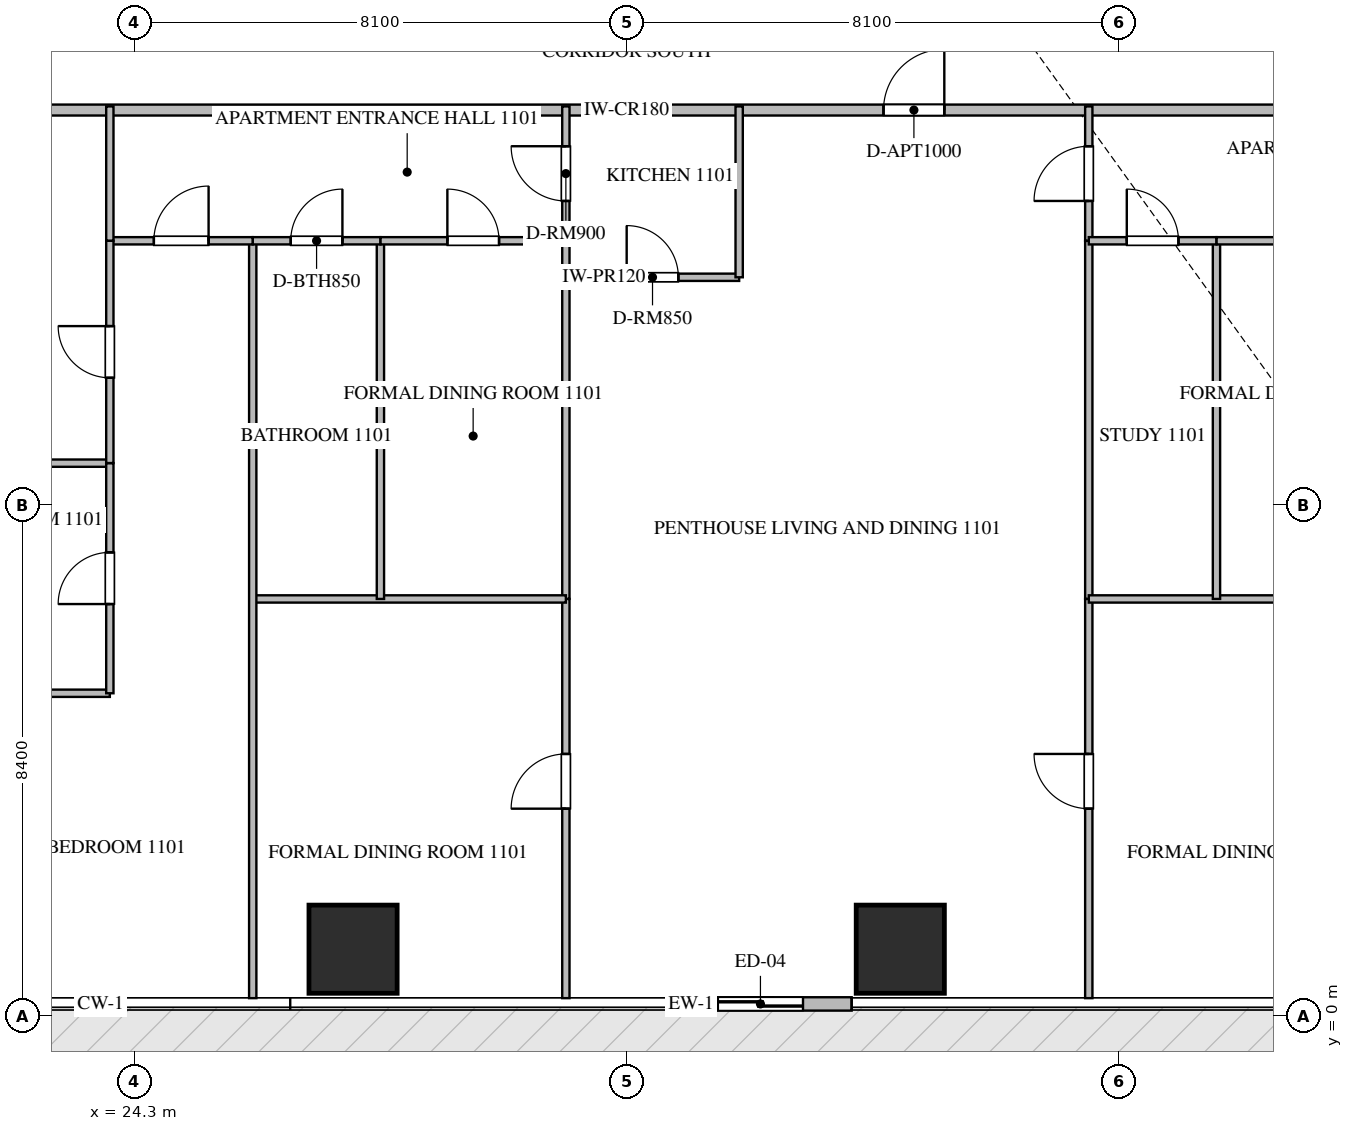
"""IFC4 building model, lengths in metres.
Left out: names, types, materials, properties, quantities, classifications, styles, units other than length and angle.
Written with IfcOpenShell. Run it as: python <this file> out.ifc"""

import sys

from ifc_helpers import new_model, si_unit, direction, frame, frame_2d, origin, origin_2d, place, context, subcontext, project, spatial, rectangle, extrude, source, transform, mapped, element, fill, save


model = new_model("IFC4")
c1 = context("Model", 3, precision=1e-05, world=origin(), true_north=direction((0.0, 1.0)))
c2 = subcontext(c1, "Body", "Model", "MODEL_VIEW")
j1 = project(units=[si_unit("LENGTHUNIT", "METRE"), si_unit("PLANEANGLEUNIT", "RADIAN")], contexts=[c1])
p1 = place(None, origin())
s1 = spatial("IfcSite", under=j1, at=p1, CompositionType="ELEMENT")
p2 = place(p1, origin())
s2 = spatial("IfcBuilding", under=s1, at=p2, CompositionType="ELEMENT")
p3 = place(p2, frame((0.0, 0.0, 49.2)))
s3 = spatial("IfcBuildingStorey", under=s2, at=p3, CompositionType="ELEMENT", Elevation=49.2)
m1 = source(origin(), c2, "Body", "SweptSolid", [
    extrude(rectangle(XDim=1.45, YDim=1.45, at=origin_2d()), origin(), (0.0, 0.0, 1.0), 3.75),
])
for number, where, z_axis, x_axis in (
    (1, (27.9, 1.1, -0.26), (0.0, 0.0, 1.0), (1.0, 0.0, 0.0)),
    (2, (36.9, 1.1, -0.26), (0.0, 0.0, 1.0), (1.0, 0.0, 0.0)),
):
    element("IfcColumn", number, at=place(p3, frame(where, z_axis=z_axis, x_axis=x_axis)), inside=s3, PredefinedType="COLUMN", context=c2, shape_type="MappedRepresentation", body=[
        mapped(m1, transform((0.0, 0.0, 0.0), scale=1.0)),
    ])
p4 = place(p3, frame((33.1, 0.2, 0.0), z_axis=(0.0, 0.0, 1.0), x_axis=(1.0, 0.0, 0.0)))
e3 = element("IfcWall", 3, at=p4, inside=s3, PredefinedType="ELEMENTEDWALL", context=c2, shape_type="SweptSolid", body=[
    extrude(rectangle(XDim=3.0, YDim=0.22, at=frame_2d((1.5, 0.0))), origin(), (0.0, 0.0, 1.0), 3.475),
])
p5 = place(p4, frame((0.8, 0.0, 0.0)))
e4 = element("IfcOpeningElement", 4, at=p5, cuts=e3, PredefinedType="OPENING", context=c2, shape_type="SweptSolid", body=[
    extrude(rectangle(XDim=1.4, YDim=2.25, at=frame_2d((0.7, 1.125))), frame((0.0, 0.12, 0.0), z_axis=(0.0, -1.0, 0.0), x_axis=(1.0, 0.0, 0.0)), (0.0, 0.0, 1.0), 0.24),
])
p6 = place(p3, frame((21.402, 14.9, 0.0), z_axis=(0.0, 0.0, 1.0), x_axis=(1.0, 0.0, 0.0)))
e5 = element("IfcWall", 5, at=p6, inside=s3, PredefinedType="PARTITIONING", context=c2, shape_type="SweptSolid", body=[
    extrude(rectangle(XDim=21.996, YDim=0.18, at=frame_2d((10.998, 0.0))), origin(), (0.0, 0.0, 1.0), 3.49),
])
p7 = place(p6, frame((15.222, 0.0, 0.0)))
e6 = element("IfcOpeningElement", 6, at=p7, cuts=e5, PredefinedType="OPENING", context=c2, shape_type="SweptSolid", body=[
    extrude(rectangle(XDim=1.0, YDim=2.15, at=frame_2d((0.5, 1.075))), frame((0.0, 0.1, 0.0), z_axis=(0.0, -1.0, 0.0), x_axis=(1.0, 0.0, 0.0)), (0.0, 0.0, 1.0), 0.2),
])
p8 = place(p3, frame((31.4, 12.15, 0.0), z_axis=(0.0, 0.0, 1.0), x_axis=(1.0, 0.0, 0.0)))
e7 = element("IfcWall", 7, at=p8, inside=s3, PredefinedType="PARTITIONING", context=c2, shape_type="SweptSolid", body=[
    extrude(rectangle(XDim=2.85, YDim=0.12, at=frame_2d((1.425, 0.0))), origin(), (0.0, 0.0, 1.0), 3.49),
])
p9 = place(p8, frame((1.0, 0.0, 0.0)))
e8 = element("IfcOpeningElement", 8, at=p9, cuts=e7, PredefinedType="OPENING", context=c2, shape_type="SweptSolid", body=[
    extrude(rectangle(XDim=0.85, YDim=2.1, at=frame_2d((0.425, 1.05))), frame((0.0, 0.07, 0.0), z_axis=(0.0, -1.0, 0.0), x_axis=(1.0, 0.0, 0.0)), (0.0, 0.0, 1.0), 0.14),
])
p10 = place(p3, frame((34.25, 12.15, 0.0), z_axis=(0.0, 0.0, 1.0), x_axis=(0.0, 1.0, 0.0)))
e9 = element("IfcWall", 9, at=p10, inside=s3, PredefinedType="PARTITIONING", context=c2, shape_type="SweptSolid", body=[
    extrude(rectangle(XDim=2.81, YDim=0.12, at=frame_2d((1.405, 0.0))), origin(), (0.0, 0.0, 1.0), 3.49),
])
p11 = place(p3, frame((31.4, 12.75, 0.0), z_axis=(0.0, 0.0, 1.0), x_axis=(0.0, 1.0, 0.0)))
e10 = element("IfcWall", 10, at=p11, inside=s3, PredefinedType="PARTITIONING", context=c2, shape_type="SweptSolid", body=[
    extrude(rectangle(XDim=2.21, YDim=0.12, at=frame_2d((1.105, 0.0))), origin(), (0.0, 0.0, 1.0), 3.49),
])
p12 = place(p11, frame((0.655, 0.0, 0.0)))
e11 = element("IfcOpeningElement", 11, at=p12, cuts=e10, PredefinedType="OPENING", context=c2, shape_type="SweptSolid", body=[
    extrude(rectangle(XDim=0.9, YDim=2.1, at=frame_2d((0.45, 1.05))), frame((0.0, 0.07, 0.0), z_axis=(0.0, -1.0, 0.0), x_axis=(1.0, 0.0, 0.0)), (0.0, 0.0, 1.0), 0.14),
])
p13 = place(p3, frame((31.4, 0.295, 0.0), z_axis=(0.0, 0.0, 1.0), x_axis=(0.0, 1.0, 0.0)))
e12 = element("IfcWall", 12, at=p13, inside=s3, PredefinedType="PARTITIONING", context=c2, shape_type="SweptSolid", body=[
    extrude(rectangle(XDim=6.565, YDim=0.12, at=frame_2d((3.283, 0.0))), origin(), (0.0, 0.0, 1.0), 3.49),
])
p14 = place(p13, frame((3.116, 0.0, 0.0)))
e13 = element("IfcOpeningElement", 13, at=p14, cuts=e12, PredefinedType="OPENING", context=c2, shape_type="SweptSolid", body=[
    extrude(rectangle(XDim=0.9, YDim=2.1, at=frame_2d((0.45, 1.05))), frame((0.0, 0.07, 0.0), z_axis=(0.0, -1.0, 0.0), x_axis=(1.0, 0.0, 0.0)), (0.0, 0.0, 1.0), 0.14),
])
p15 = place(p3, frame((31.4, 6.862, 0.0), z_axis=(0.0, 0.0, 1.0), x_axis=(0.0, 1.0, 0.0)))
e14 = element("IfcWall", 14, at=p15, inside=s3, PredefinedType="PARTITIONING", context=c2, shape_type="SweptSolid", body=[
    extrude(rectangle(XDim=5.886, YDim=0.12, at=frame_2d((2.943, 0.0))), origin(), (0.0, 0.0, 1.0), 3.49),
])
p16 = place(p3, frame((26.25, 6.86, 0.0), z_axis=(0.0, 0.0, 1.0), x_axis=(1.0, 0.0, 0.0)))
e15 = element("IfcWall", 15, at=p16, inside=s3, PredefinedType="PARTITIONING", context=c2, shape_type="SweptSolid", body=[
    extrude(rectangle(XDim=5.15, YDim=0.12, at=frame_2d((2.575, 0.0))), origin(), (0.0, 0.0, 1.0), 3.49),
])
p17 = place(p3, frame((26.25, 0.295, 0.0), z_axis=(0.0, 0.0, 1.0), x_axis=(0.0, 1.0, 0.0)))
e16 = element("IfcWall", 16, at=p17, inside=s3, PredefinedType="PARTITIONING", context=c2, shape_type="SweptSolid", body=[
    extrude(rectangle(XDim=12.455, YDim=0.12, at=frame_2d((6.228, 0.0))), origin(), (0.0, 0.0, 1.0), 3.49),
])
p18 = place(p3, frame((28.35, 6.86, 0.0), z_axis=(0.0, 0.0, 1.0), x_axis=(0.0, 1.0, 0.0)))
e17 = element("IfcWall", 17, at=p18, inside=s3, PredefinedType="PARTITIONING", context=c2, shape_type="SweptSolid", body=[
    extrude(rectangle(XDim=5.89, YDim=0.12, at=frame_2d((2.945, 0.0))), origin(), (0.0, 0.0, 1.0), 3.49),
])
p19 = place(p3, frame((26.25, 12.75, 0.0), z_axis=(0.0, 0.0, 1.0), x_axis=(1.0, 0.0, 0.0)))
e18 = element("IfcWall", 18, at=p19, inside=s3, PredefinedType="PARTITIONING", context=c2, shape_type="SweptSolid", body=[
    extrude(rectangle(XDim=2.1, YDim=0.12, at=frame_2d((1.05, 0.0))), origin(), (0.0, 0.0, 1.0), 3.49),
])
p20 = place(p19, frame((0.625, 0.0, 0.0)))
e19 = element("IfcOpeningElement", 19, at=p20, cuts=e18, PredefinedType="OPENING", context=c2, shape_type="SweptSolid", body=[
    extrude(rectangle(XDim=0.85, YDim=2.1, at=frame_2d((0.425, 1.05))), frame((0.0, 0.07, 0.0), z_axis=(0.0, -1.0, 0.0), x_axis=(1.0, 0.0, 0.0)), (0.0, 0.0, 1.0), 0.14),
])
p21 = place(p3, frame((28.352, 12.75, 0.0), z_axis=(0.0, 0.0, 1.0), x_axis=(1.0, 0.0, 0.0)))
e20 = element("IfcWall", 20, at=p21, inside=s3, PredefinedType="PARTITIONING", context=c2, shape_type="SweptSolid", body=[
    extrude(rectangle(XDim=3.048, YDim=0.12, at=frame_2d((1.524, 0.0))), origin(), (0.0, 0.0, 1.0), 3.49),
])
p22 = place(p21, frame((1.099, 0.0, 0.0)))
e21 = element("IfcOpeningElement", 21, at=p22, cuts=e20, PredefinedType="OPENING", context=c2, shape_type="SweptSolid", body=[
    extrude(rectangle(XDim=0.85, YDim=2.1, at=frame_2d((0.425, 1.05))), frame((0.0, 0.07, 0.0), z_axis=(0.0, -1.0, 0.0), x_axis=(1.0, 0.0, 0.0)), (0.0, 0.0, 1.0), 0.14),
])
p23 = place(p3, frame((23.9, 12.75, 0.0), z_axis=(0.0, 0.0, 1.0), x_axis=(1.0, 0.0, 0.0)))
e22 = element("IfcWall", 22, at=p23, inside=s3, PredefinedType="PARTITIONING", context=c2, shape_type="SweptSolid", body=[
    extrude(rectangle(XDim=2.348, YDim=0.12, at=frame_2d((1.174, 0.0))), origin(), (0.0, 0.0, 1.0), 3.49),
])
p24 = place(p23, frame((0.724, 0.0, 0.0)))
e23 = element("IfcOpeningElement", 23, at=p24, cuts=e22, PredefinedType="OPENING", context=c2, shape_type="SweptSolid", body=[
    extrude(rectangle(XDim=0.9, YDim=2.1, at=frame_2d((0.45, 1.05))), frame((0.0, 0.07, 0.0), z_axis=(0.0, -1.0, 0.0), x_axis=(1.0, 0.0, 0.0)), (0.0, 0.0, 1.0), 0.14),
])
for number, where, z_axis, x_axis in (
    (24, (20.2, 5.309, 0.0), (0.0, 0.0, 1.0), (1.0, 0.0, 0.0)),
    (25, (20.2, 9.093, 0.0), (0.0, 0.0, 1.0), (1.0, 0.0, 0.0)),
):
    element("IfcWall", number, at=place(p3, frame(where, z_axis=z_axis, x_axis=x_axis)), inside=s3, PredefinedType="PARTITIONING", context=c2, shape_type="SweptSolid", body=[
        extrude(rectangle(XDim=3.7, YDim=0.12, at=frame_2d((1.85, 0.0))), origin(), (0.0, 0.0, 1.0), 3.49),
    ])
p25 = place(p3, frame((23.9, 5.309, 0.0), z_axis=(0.0, 0.0, 1.0), x_axis=(0.0, 1.0, 0.0)))
e26 = element("IfcWall", 26, at=p25, inside=s3, PredefinedType="PARTITIONING", context=c2, shape_type="SweptSolid", body=[
    extrude(rectangle(XDim=3.784, YDim=0.12, at=frame_2d((1.892, 0.0))), origin(), (0.0, 0.0, 1.0), 3.49),
])
p26 = place(p25, frame((1.467, 0.0, 0.0)))
e27 = element("IfcOpeningElement", 27, at=p26, cuts=e26, PredefinedType="OPENING", context=c2, shape_type="SweptSolid", body=[
    extrude(rectangle(XDim=0.85, YDim=2.1, at=frame_2d((0.425, 1.05))), frame((0.0, 0.07, 0.0), z_axis=(0.0, -1.0, 0.0), x_axis=(1.0, 0.0, 0.0)), (0.0, 0.0, 1.0), 0.14),
])
p27 = place(p3, frame((23.9, 9.095, 0.0), z_axis=(0.0, 0.0, 1.0), x_axis=(0.0, 1.0, 0.0)))
e28 = element("IfcWall", 28, at=p27, inside=s3, PredefinedType="PARTITIONING", context=c2, shape_type="SweptSolid", body=[
    extrude(rectangle(XDim=3.655, YDim=0.12, at=frame_2d((1.828, 0.0))), origin(), (0.0, 0.0, 1.0), 3.49),
])
p28 = place(p27, frame((1.402, 0.0, 0.0)))
e29 = element("IfcOpeningElement", 29, at=p28, cuts=e28, PredefinedType="OPENING", context=c2, shape_type="SweptSolid", body=[
    extrude(rectangle(XDim=0.85, YDim=2.1, at=frame_2d((0.425, 1.05))), frame((0.0, 0.07, 0.0), z_axis=(0.0, -1.0, 0.0), x_axis=(1.0, 0.0, 0.0)), (0.0, 0.0, 1.0), 0.14),
])
p29 = place(p3, frame((23.9, 12.752, 0.0), z_axis=(0.0, 0.0, 1.0), x_axis=(0.0, 1.0, 0.0)))
e30 = element("IfcWall", 30, at=p29, inside=s3, PredefinedType="PARTITIONING", context=c2, shape_type="SweptSolid", body=[
    extrude(rectangle(XDim=2.208, YDim=0.12, at=frame_2d((1.104, 0.0))), origin(), (0.0, 0.0, 1.0), 3.49),
])
p30 = place(p3, frame((40.0, 12.75, 0.0), z_axis=(0.0, 0.0, 1.0), x_axis=(0.0, 1.0, 0.0)))
e31 = element("IfcWall", 31, at=p30, inside=s3, PredefinedType="PARTITIONING", context=c2, shape_type="SweptSolid", body=[
    extrude(rectangle(XDim=2.21, YDim=0.12, at=frame_2d((1.105, 0.0))), origin(), (0.0, 0.0, 1.0), 3.49),
])
p31 = place(p30, frame((0.655, 0.0, 0.0)))
e32 = element("IfcOpeningElement", 32, at=p31, cuts=e31, PredefinedType="OPENING", context=c2, shape_type="SweptSolid", body=[
    extrude(rectangle(XDim=0.9, YDim=2.1, at=frame_2d((0.45, 1.05))), frame((0.0, 0.07, 0.0), z_axis=(0.0, -1.0, 0.0), x_axis=(1.0, 0.0, 0.0)), (0.0, 0.0, 1.0), 0.14),
])
p32 = place(p3, frame((40.0, 0.295, 0.0), z_axis=(0.0, 0.0, 1.0), x_axis=(0.0, 1.0, 0.0)))
e33 = element("IfcWall", 33, at=p32, inside=s3, PredefinedType="PARTITIONING", context=c2, shape_type="SweptSolid", body=[
    extrude(rectangle(XDim=6.565, YDim=0.12, at=frame_2d((3.283, 0.0))), origin(), (0.0, 0.0, 1.0), 3.49),
])
p33 = place(p32, frame((3.116, 0.0, 0.0)))
e34 = element("IfcOpeningElement", 34, at=p33, cuts=e33, PredefinedType="OPENING", context=c2, shape_type="SweptSolid", body=[
    extrude(rectangle(XDim=0.9, YDim=2.1, at=frame_2d((0.45, 1.05))), frame((0.0, 0.07, 0.0), z_axis=(0.0, -1.0, 0.0), x_axis=(1.0, 0.0, 0.0)), (0.0, 0.0, 1.0), 0.14),
])
p34 = place(p3, frame((40.0, 6.862, 0.0), z_axis=(0.0, 0.0, 1.0), x_axis=(0.0, 1.0, 0.0)))
e35 = element("IfcWall", 35, at=p34, inside=s3, PredefinedType="PARTITIONING", context=c2, shape_type="SweptSolid", body=[
    extrude(rectangle(XDim=5.886, YDim=0.12, at=frame_2d((2.943, 0.0))), origin(), (0.0, 0.0, 1.0), 3.49),
])
p35 = place(p3, frame((40.0, 6.86, 0.0), z_axis=(0.0, 0.0, 1.0), x_axis=(1.0, 0.0, 0.0)))
e36 = element("IfcWall", 36, at=p35, inside=s3, PredefinedType="PARTITIONING", context=c2, shape_type="SweptSolid", body=[
    extrude(rectangle(XDim=5.15, YDim=0.12, at=frame_2d((2.575, 0.0))), origin(), (0.0, 0.0, 1.0), 3.49),
])
p36 = place(p3, frame((42.1, 6.86, 0.0), z_axis=(0.0, 0.0, 1.0), x_axis=(0.0, 1.0, 0.0)))
e37 = element("IfcWall", 37, at=p36, inside=s3, PredefinedType="PARTITIONING", context=c2, shape_type="SweptSolid", body=[
    extrude(rectangle(XDim=5.89, YDim=0.12, at=frame_2d((2.945, 0.0))), origin(), (0.0, 0.0, 1.0), 3.49),
])
p37 = place(p3, frame((40.0, 12.75, 0.0), z_axis=(0.0, 0.0, 1.0), x_axis=(1.0, 0.0, 0.0)))
e38 = element("IfcWall", 38, at=p37, inside=s3, PredefinedType="PARTITIONING", context=c2, shape_type="SweptSolid", body=[
    extrude(rectangle(XDim=2.1, YDim=0.12, at=frame_2d((1.05, 0.0))), origin(), (0.0, 0.0, 1.0), 3.49),
])
p38 = place(p37, frame((0.625, 0.0, 0.0)))
e39 = element("IfcOpeningElement", 39, at=p38, cuts=e38, PredefinedType="OPENING", context=c2, shape_type="SweptSolid", body=[
    extrude(rectangle(XDim=0.85, YDim=2.1, at=frame_2d((0.425, 1.05))), frame((0.0, 0.07, 0.0), z_axis=(0.0, -1.0, 0.0), x_axis=(1.0, 0.0, 0.0)), (0.0, 0.0, 1.0), 0.14),
])
p39 = place(p3, frame((42.102, 12.75, 0.0), z_axis=(0.0, 0.0, 1.0), x_axis=(1.0, 0.0, 0.0)))
e40 = element("IfcWall", 40, at=p39, inside=s3, PredefinedType="PARTITIONING", context=c2, shape_type="SweptSolid", body=[
    extrude(rectangle(XDim=3.048, YDim=0.12, at=frame_2d((1.524, 0.0))), origin(), (0.0, 0.0, 1.0), 3.49),
])
p40 = place(p39, frame((1.099, 0.0, 0.0)))
e41 = element("IfcOpeningElement", 41, at=p40, cuts=e40, PredefinedType="OPENING", context=c2, shape_type="SweptSolid", body=[
    extrude(rectangle(XDim=0.85, YDim=2.1, at=frame_2d((0.425, 1.05))), frame((0.0, 0.07, 0.0), z_axis=(0.0, -1.0, 0.0), x_axis=(1.0, 0.0, 0.0)), (0.0, 0.0, 1.0), 0.14),
])
m2 = source(origin(), c2, "Body", "SweptSolid", [
    extrude(rectangle(XDim=1.4, YDim=2.25, at=frame_2d((0.7, 1.125))), frame((0.0, 0.025, 0.0), z_axis=(0.0, -1.0, 0.0), x_axis=(1.0, 0.0, 0.0)), (0.0, 0.0, 1.0), 0.05),
])
p41 = place(p5, origin())
e42 = element("IfcDoor", 42, at=p41, inside=s3, OperationType="SLIDING_TO_LEFT", PredefinedType="DOOR", context=c2, shape_type="MappedRepresentation", body=[
    mapped(m2, transform((0.0, 0.0, 0.0), scale=1.0)),
])
fill(e4, e42)
m3 = source(origin(), c2, "Body", "SweptSolid", [
    extrude(rectangle(XDim=1.0, YDim=2.15, at=frame_2d((0.5, 1.075))), frame((0.0, 0.025, 0.0), z_axis=(0.0, -1.0, 0.0), x_axis=(1.0, 0.0, 0.0)), (0.0, 0.0, 1.0), 0.05),
])
p42 = place(p7, origin())
e43 = element("IfcDoor", 43, at=p42, inside=s3, OperationType="SINGLE_SWING_RIGHT", PredefinedType="DOOR", context=c2, shape_type="MappedRepresentation", body=[
    mapped(m3, transform((0.0, 0.0, 0.0), scale=1.0)),
])
fill(e6, e43)
m4 = source(origin(), c2, "Body", "SweptSolid", [
    extrude(rectangle(XDim=0.85, YDim=2.1, at=frame_2d((0.425, 1.05))), frame((0.0, 0.025, 0.0), z_axis=(0.0, -1.0, 0.0), x_axis=(1.0, 0.0, 0.0)), (0.0, 0.0, 1.0), 0.05),
])
p43 = place(p9, origin())
e44 = element("IfcDoor", 44, at=p43, inside=s3, OperationType="SINGLE_SWING_LEFT", PredefinedType="DOOR", context=c2, shape_type="MappedRepresentation", body=[
    mapped(m4, transform((0.0, 0.0, 0.0), scale=1.0)),
])
fill(e8, e44)
m5 = source(origin(), c2, "Body", "SweptSolid", [
    extrude(rectangle(XDim=0.9, YDim=2.1, at=frame_2d((0.45, 1.05))), frame((0.0, 0.025, 0.0), z_axis=(0.0, -1.0, 0.0), x_axis=(1.0, 0.0, 0.0)), (0.0, 0.0, 1.0), 0.05),
])
p44 = place(p12, origin())
e45 = element("IfcDoor", 45, at=p44, inside=s3, OperationType="SINGLE_SWING_RIGHT", PredefinedType="DOOR", context=c2, shape_type="MappedRepresentation", body=[
    mapped(m5, transform((0.0, 0.0, 0.0), scale=1.0)),
])
fill(e11, e45)
p45 = place(p14, origin())
e46 = element("IfcDoor", 46, at=p45, inside=s3, OperationType="SINGLE_SWING_LEFT", PredefinedType="DOOR", context=c2, shape_type="MappedRepresentation", body=[
    mapped(m5, transform((0.0, 0.0, 0.0), scale=1.0)),
])
fill(e13, e46)
p46 = place(p20, origin())
e47 = element("IfcDoor", 47, at=p46, inside=s3, OperationType="SINGLE_SWING_RIGHT", PredefinedType="DOOR", context=c2, shape_type="MappedRepresentation", body=[
    mapped(m4, transform((0.0, 0.0, 0.0), scale=1.0)),
])
fill(e19, e47)
p47 = place(p22, origin())
e48 = element("IfcDoor", 48, at=p47, inside=s3, OperationType="SINGLE_SWING_LEFT", PredefinedType="DOOR", context=c2, shape_type="MappedRepresentation", body=[
    mapped(m4, transform((0.0, 0.0, 0.0), scale=1.0)),
])
fill(e21, e48)
p48 = place(p24, origin())
e49 = element("IfcDoor", 49, at=p48, inside=s3, OperationType="SINGLE_SWING_RIGHT", PredefinedType="DOOR", context=c2, shape_type="MappedRepresentation", body=[
    mapped(m5, transform((0.0, 0.0, 0.0), scale=1.0)),
])
fill(e23, e49)
p49 = place(p26, origin())
e50 = element("IfcDoor", 50, at=p49, inside=s3, OperationType="SINGLE_SWING_LEFT", PredefinedType="DOOR", context=c2, shape_type="MappedRepresentation", body=[
    mapped(m4, transform((0.0, 0.0, 0.0), scale=1.0)),
])
fill(e27, e50)
p50 = place(p28, origin())
e51 = element("IfcDoor", 51, at=p50, inside=s3, OperationType="SINGLE_SWING_RIGHT", PredefinedType="DOOR", context=c2, shape_type="MappedRepresentation", body=[
    mapped(m4, transform((0.0, 0.0, 0.0), scale=1.0)),
])
fill(e29, e51)
p51 = place(p31, origin())
e52 = element("IfcDoor", 52, at=p51, inside=s3, OperationType="SINGLE_SWING_LEFT", PredefinedType="DOOR", context=c2, shape_type="MappedRepresentation", body=[
    mapped(m5, transform((0.0, 0.0, 0.0), scale=1.0)),
])
fill(e32, e52)
p52 = place(p33, origin())
e53 = element("IfcDoor", 53, at=p52, inside=s3, OperationType="SINGLE_SWING_RIGHT", PredefinedType="DOOR", context=c2, shape_type="MappedRepresentation", body=[
    mapped(m5, transform((0.0, 0.0, 0.0), scale=1.0)),
])
fill(e34, e53)
p53 = place(p38, origin())
e54 = element("IfcDoor", 54, at=p53, inside=s3, OperationType="SINGLE_SWING_LEFT", PredefinedType="DOOR", context=c2, shape_type="MappedRepresentation", body=[
    mapped(m4, transform((0.0, 0.0, 0.0), scale=1.0)),
])
fill(e39, e54)
save(model, sys.argv[1])
